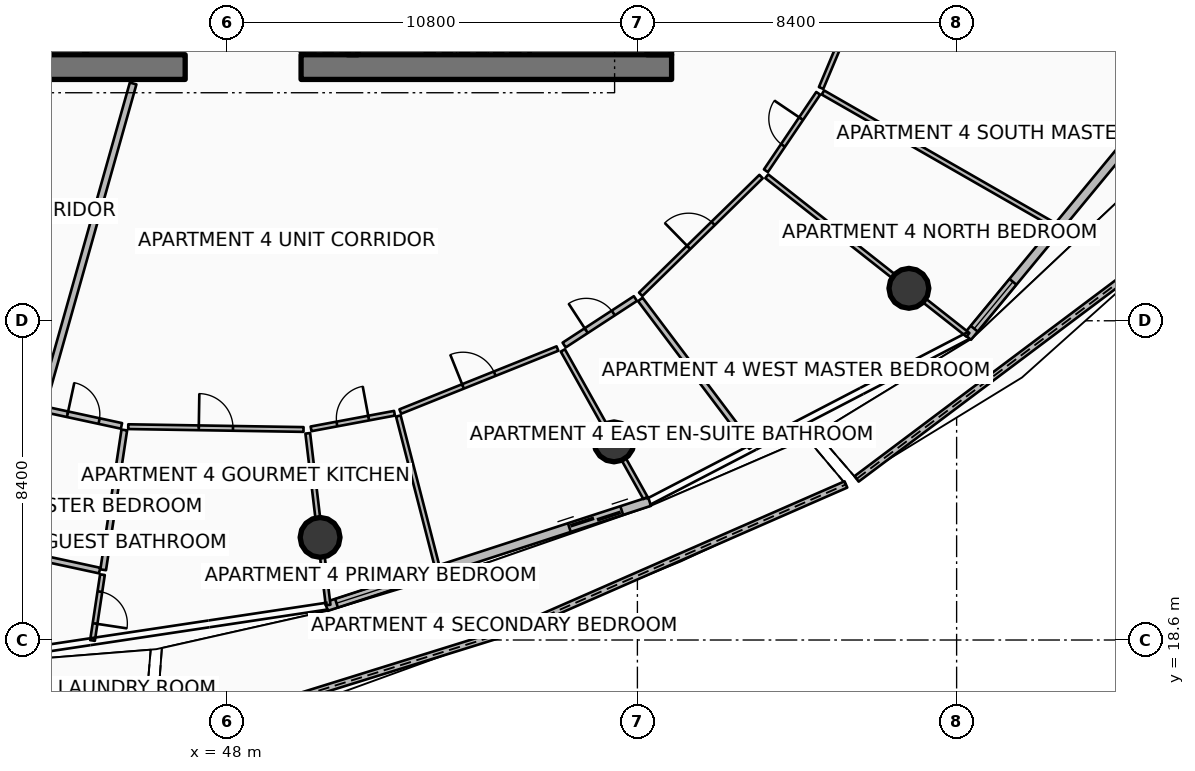
"""IFC4 building model, lengths in metres.
Left out: names, types, materials, properties, quantities, classifications, styles, units other than length and angle.
Written with IfcOpenShell. Run it as: python <this file> out.ifc"""

import sys

from ifc_helpers import new_model, si_unit, direction, frame, frame_2d, origin, origin_2d, place, context, subcontext, project, spatial, polyline, rectangle, circle, outline, extrude, element, fill, save


model = new_model("IFC4")
c1 = context("Model", 3, precision=1e-05, world=origin(), true_north=direction((0.0, 1.0)))
c2 = subcontext(c1, "Body", "Model", "MODEL_VIEW")
j1 = project(units=[si_unit("LENGTHUNIT", "METRE"), si_unit("PLANEANGLEUNIT", "RADIAN")], contexts=[c1])
p1 = place(None, origin())
s1 = spatial("IfcSite", under=j1, at=p1, CompositionType="ELEMENT")
p2 = place(p1, origin())
s2 = spatial("IfcBuilding", under=s1, at=p2, CompositionType="ELEMENT")
p3 = place(p2, frame((0.0, 0.0, 176.55)))
s3 = spatial("IfcBuildingStorey", under=s2, at=p3, CompositionType="ELEMENT", Elevation=176.55)
for number, where, z_axis, x_axis in (
    (1, (37.15, 33.675, 0.0), (0.0, 0.0, 1.0), (1.0, 0.0, 0.0)),
    (2, (49.95, 33.675, 0.0), (0.0, 0.0, 1.0), (1.0, 0.0, 0.0)),
):
    element("IfcWall", number, at=place(p3, frame(where, z_axis=z_axis, x_axis=x_axis)), inside=s3, PredefinedType="SHEAR", context=c2, shape_type="SweptSolid", body=[
        extrude(rectangle(XDim=9.75, YDim=0.65, at=frame_2d((4.875, 0.0))), origin(), (0.0, 0.0, 1.0), 3.75),
    ])
p4 = place(p3, frame((59.375, 34.0, 0.0), z_axis=(0.0, 0.0, 1.0), x_axis=(0.0, 1.0, 0.0)))
e3 = element("IfcWall", 3, at=p4, inside=s3, PredefinedType="SHEAR", context=c2, shape_type="SweptSolid", body=[
    extrude(rectangle(XDim=16.0, YDim=0.65, at=frame_2d((8.0, 0.0))), origin(), (0.0, 0.0, 1.0), 3.75),
])
p5 = place(p3, frame((51.31, 34.0, 0.0), z_axis=(0.0, 0.0, 1.0), x_axis=(0.0, 1.0, 0.0)))
e4 = element("IfcWall", 4, at=p5, inside=s3, PredefinedType="SHEAR", context=c2, shape_type="SweptSolid", body=[
    extrude(rectangle(XDim=3.5, YDim=0.28, at=frame_2d((1.75, 0.0))), origin(), (0.0, 0.0, 1.0), 3.75),
])
for number, where, z_axis, x_axis in (
    (5, (50.45, 21.3, 0.0), (0.0, 0.0, 1.0), (1.0, 0.0, 0.0)),
    (6, (58.185, 23.814, 0.0), (0.0, 0.0, 1.0), (1.0, 0.0, 0.0)),
    (7, (65.944, 27.854, 0.0), (0.0, 0.0, 1.0), (1.0, 0.0, 0.0)),
):
    element("IfcColumn", number, at=place(p3, frame(where, z_axis=z_axis, x_axis=x_axis)), inside=s3, PredefinedType="COLUMN", context=c2, shape_type="SweptSolid", body=[
        extrude(circle(Radius=0.525, at=origin_2d()), origin(), (0.0, 0.0, 1.0), 3.5),
    ])
p6 = place(p3, frame((46.108, 15.929, 0.0), z_axis=(0.0, 0.0, 1.0), x_axis=(0.954909554677, 0.296896854793, 0.0)))
e8 = element("IfcWall", 8, at=p6, inside=s3, PredefinedType="PARAPET", context=c2, shape_type="SweptSolid", body=[
    extrude(outline(polyline([(0.0, 0.0), (9.736, 0.0), (9.736, 1.348), (4.868, 1.562), (0.0, 1.747), (0.0, 0.0)])), frame((0.0, 0.09, 0.0), z_axis=(0.0, -1.0, 0.0), x_axis=(1.0, 0.0, 0.0)), (0.0, 0.0, 1.0), 0.18),
])
p7 = place(p3, frame((55.63, 18.903, 0.0), z_axis=(0.0, 0.0, 1.0), x_axis=(0.916057097562, 0.401047869968, 0.0)))
e9 = element("IfcWall", 9, at=p7, inside=s3, PredefinedType="PARAPET", context=c2, shape_type="SweptSolid", body=[
    extrude(outline(polyline([(0.0, 0.0), (9.45, 0.0), (9.45, 1.12), (4.725, 1.182), (0.0, 1.348), (0.0, 0.0)])), frame((0.0, 0.09, 0.0), z_axis=(0.0, -1.0, 0.0), x_axis=(1.0, 0.0, 0.0)), (0.0, 0.0, 1.0), 0.18),
])
p8 = place(p3, frame((64.568, 22.84, 0.0), z_axis=(0.0, 0.0, 1.0), x_axis=(0.799768695593, 0.600308282093, 0.0)))
e10 = element("IfcWall", 10, at=p8, inside=s3, PredefinedType="PARAPET", context=c2, shape_type="SweptSolid", body=[
    extrude(outline(polyline([(0.0, 0.0), (10.515, 0.0), (10.515, 1.348), (5.258, 1.182), (0.0, 1.12), (0.0, 0.0)])), frame((0.0, 0.09, 0.0), z_axis=(0.0, -1.0, 0.0), x_axis=(1.0, 0.0, 0.0)), (0.0, 0.0, 1.0), 0.18),
])
p9 = place(p3, frame((50.616, 19.481, 0.0), z_axis=(0.0, 0.0, 1.0), x_axis=(0.951058543936, 0.309010753869, 0.0)))
e11 = element("IfcWall", 11, at=p9, inside=s3, PredefinedType="SOLIDWALL", context=c2, shape_type="SweptSolid", body=[
    extrude(rectangle(XDim=8.942, YDim=0.24, at=frame_2d((4.471, 0.0))), origin(), (0.0, 0.0, 1.0), 2.45),
])
p10 = place(p9, frame((6.722, 0.0, 0.0)))
e12 = element("IfcOpeningElement", 12, at=p10, cuts=e11, PredefinedType="OPENING", context=c2, shape_type="SweptSolid", body=[
    extrude(rectangle(XDim=1.45, YDim=2.15, at=frame_2d((0.725, 1.075))), frame((0.0, 0.13, 0.0), z_axis=(0.0, -1.0, 0.0), x_axis=(1.0, 0.0, 0.0)), (0.0, 0.0, 1.0), 0.26),
])
p11 = place(p9, frame((0.28, 0.0, 0.65)))
e13 = element("IfcOpeningElement", 13, at=p11, cuts=e11, PredefinedType="OPENING", context=c2, shape_type="SweptSolid", body=[
    extrude(rectangle(XDim=1.6, YDim=1.5, at=frame_2d((0.8, 0.75))), frame((0.0, 0.13, 0.0), z_axis=(0.0, -1.0, 0.0), x_axis=(1.0, 0.0, 0.0)), (0.0, 0.0, 1.0), 0.26),
])
p12 = place(p3, frame((67.485, 26.576, 0.0), z_axis=(0.0, 0.0, 1.0), x_axis=(0.636759394418, 0.771062561418, 0.0)))
e14 = element("IfcWall", 14, at=p12, inside=s3, PredefinedType="SOLIDWALL", context=c2, shape_type="SweptSolid", body=[
    extrude(rectangle(XDim=10.494, YDim=0.24, at=frame_2d((5.247, 0.0))), origin(), (0.0, 0.0, 1.0), 2.45),
])
p13 = place(p12, frame((8.274, 0.0, 0.0)))
e15 = element("IfcOpeningElement", 15, at=p13, cuts=e14, PredefinedType="OPENING", context=c2, shape_type="SweptSolid", body=[
    extrude(rectangle(XDim=1.45, YDim=2.15, at=frame_2d((0.725, 1.075))), frame((0.0, 0.13, 0.0), z_axis=(0.0, -1.0, 0.0), x_axis=(1.0, 0.0, 0.0)), (0.0, 0.0, 1.0), 0.26),
])
p14 = place(p12, frame((0.28, 0.0, 0.65)))
e16 = element("IfcOpeningElement", 16, at=p14, cuts=e14, PredefinedType="OPENING", context=c2, shape_type="SweptSolid", body=[
    extrude(rectangle(XDim=1.6, YDim=1.5, at=frame_2d((0.8, 0.75))), frame((0.0, 0.13, 0.0), z_axis=(0.0, -1.0, 0.0), x_axis=(1.0, 0.0, 0.0)), (0.0, 0.0, 1.0), 0.26),
])
p15 = place(p3, frame((44.28, 34.05, 0.0), z_axis=(0.0, 0.0, 1.0), x_axis=(0.0, 1.0, 0.0)))
e17 = element("IfcWall", 17, at=p15, inside=s3, PredefinedType="PARTITIONING", context=c2, shape_type="SweptSolid", body=[
    extrude(rectangle(XDim=2.03, YDim=0.125, at=frame_2d((1.015, 0.0))), origin(), (0.0, 0.0, 1.0), 2.94),
])
p16 = place(p3, frame((45.531, 33.244, 0.0), z_axis=(0.0, 0.0, 1.0), x_axis=(-0.271437162306, -0.962456163635, 0.0)))
e18 = element("IfcWall", 18, at=p16, inside=s3, PredefinedType="PARTITIONING", context=c2, shape_type="SweptSolid", body=[
    extrude(rectangle(XDim=15.63, YDim=0.18, at=frame_2d((7.815, 0.0))), origin(), (0.0, 0.0, 1.0), 2.94),
])
p17 = place(p3, frame((43.215, 24.667, 0.0), z_axis=(0.0, 0.0, 1.0), x_axis=(0.977507597701, -0.210900204925, 0.0)))
e19 = element("IfcWall", 19, at=p17, inside=s3, PredefinedType="PARTITIONING", context=c2, shape_type="SweptSolid", body=[
    extrude(rectangle(XDim=2.055, YDim=0.15, at=frame_2d((1.027, 0.0))), origin(), (0.0, 0.0, 1.0), 2.94),
])
p18 = place(p17, frame((0.602, 0.0, 0.0)))
e20 = element("IfcOpeningElement", 20, at=p18, cuts=e19, PredefinedType="OPENING", context=c2, shape_type="SweptSolid", body=[
    extrude(rectangle(XDim=0.85, YDim=2.06, at=frame_2d((0.425, 1.03))), frame((0.0, 0.085, 0.0), z_axis=(0.0, -1.0, 0.0), x_axis=(1.0, 0.0, 0.0)), (0.0, 0.0, 1.0), 0.17),
])
p19 = place(p3, frame((42.17, 20.962, 0.0), z_axis=(0.0, 0.0, 1.0), x_axis=(0.977505473959, -0.210910048076, 0.0)))
e21 = element("IfcWall", 21, at=p19, inside=s3, PredefinedType="PARTITIONING", context=c2, shape_type="SweptSolid", body=[
    extrude(rectangle(XDim=2.535, YDim=0.15, at=frame_2d((1.268, 0.0))), origin(), (0.0, 0.0, 1.0), 2.94),
])
p20 = place(p3, frame((45.298, 24.126, 0.0), z_axis=(0.0, 0.0, 1.0), x_axis=(-0.149437927454, -0.988771108922, 0.0)))
e22 = element("IfcWall", 22, at=p20, inside=s3, PredefinedType="PARTITIONING", context=c2, shape_type="SweptSolid", body=[
    extrude(rectangle(XDim=3.72, YDim=0.15, at=frame_2d((1.86, 0.0))), origin(), (0.0, 0.0, 1.0), 2.94),
])
p21 = place(p3, frame((44.723, 20.319, 0.0), z_axis=(0.0, 0.0, 1.0), x_axis=(-0.14945844671, -0.988768007526, 0.0)))
e23 = element("IfcWall", 23, at=p21, inside=s3, PredefinedType="PARTITIONING", context=c2, shape_type="SweptSolid", body=[
    extrude(rectangle(XDim=1.751, YDim=0.125, at=frame_2d((0.875, 0.0))), origin(), (0.0, 0.0, 1.0), 2.94),
])
p22 = place(p21, frame((0.451, 0.0, 0.0)))
e24 = element("IfcOpeningElement", 24, at=p22, cuts=e23, PredefinedType="OPENING", context=c2, shape_type="SweptSolid", body=[
    extrude(rectangle(XDim=0.85, YDim=2.06, at=frame_2d((0.425, 1.03))), frame((0.0, 0.073, 0.0), z_axis=(0.0, -1.0, 0.0), x_axis=(1.0, 0.0, 0.0)), (0.0, 0.0, 1.0), 0.145),
])
p23 = place(p3, frame((45.402, 24.214, 0.0), z_axis=(0.0, 0.0, 1.0), x_axis=(0.999870557478, -0.016089384368, 0.0)))
e25 = element("IfcWall", 25, at=p23, inside=s3, PredefinedType="PARTITIONING", context=c2, shape_type="SweptSolid", body=[
    extrude(rectangle(XDim=4.613, YDim=0.125, at=frame_2d((2.306, 0.0))), origin(), (0.0, 0.0, 1.0), 2.94),
])
p24 = place(p23, frame((1.856, 0.0, 0.0)))
e26 = element("IfcOpeningElement", 26, at=p24, cuts=e25, PredefinedType="OPENING", context=c2, shape_type="SweptSolid", body=[
    extrude(rectangle(XDim=0.9, YDim=2.08, at=frame_2d((0.45, 1.04))), frame((0.0, 0.073, 0.0), z_axis=(0.0, -1.0, 0.0), x_axis=(1.0, 0.0, 0.0)), (0.0, 0.0, 1.0), 0.145),
])
p25 = place(p3, frame((50.126, 24.038, 0.0), z_axis=(0.0, 0.0, 1.0), x_axis=(0.117498349672, -0.993073077787, 0.0)))
e27 = element("IfcWall", 27, at=p25, inside=s3, PredefinedType="PARTITIONING", context=c2, shape_type="SweptSolid", body=[
    extrude(rectangle(XDim=4.548, YDim=0.125, at=frame_2d((2.274, 0.0))), origin(), (0.0, 0.0, 1.0), 2.94),
])
p26 = place(p3, frame((52.51, 24.494, 0.0), z_axis=(0.0, 0.0, 1.0), x_axis=(0.249438502074, -0.968390641055, 0.0)))
e28 = element("IfcWall", 28, at=p26, inside=s3, PredefinedType="PARTITIONING", context=c2, shape_type="SweptSolid", body=[
    extrude(rectangle(XDim=4.066, YDim=0.125, at=frame_2d((2.033, 0.0))), origin(), (0.0, 0.0, 1.0), 2.94),
])
p27 = place(p3, frame((50.212, 24.156, 0.0), z_axis=(0.0, 0.0, 1.0), x_axis=(0.982938932549, 0.183932201855, 0.0)))
e29 = element("IfcWall", 29, at=p27, inside=s3, PredefinedType="PARTITIONING", context=c2, shape_type="SweptSolid", body=[
    extrude(rectangle(XDim=2.234, YDim=0.125, at=frame_2d((1.117, 0.0))), origin(), (0.0, 0.0, 1.0), 2.94),
])
p28 = place(p27, frame((0.692, 0.0, 0.0)))
e30 = element("IfcOpeningElement", 30, at=p28, cuts=e29, PredefinedType="OPENING", context=c2, shape_type="SweptSolid", body=[
    extrude(rectangle(XDim=0.85, YDim=2.06, at=frame_2d((0.425, 1.03))), frame((0.0, 0.073, 0.0), z_axis=(0.0, -1.0, 0.0), x_axis=(1.0, 0.0, 0.0)), (0.0, 0.0, 1.0), 0.145),
])
p29 = place(p3, frame((52.561, 24.611, 0.0), z_axis=(0.0, 0.0, 1.0), x_axis=(0.92816265329, 0.372174809784, 0.0)))
e31 = element("IfcWall", 31, at=p29, inside=s3, PredefinedType="PARTITIONING", context=c2, shape_type="SweptSolid", body=[
    extrude(rectangle(XDim=4.455, YDim=0.125, at=frame_2d((2.228, 0.0))), origin(), (0.0, 0.0, 1.0), 2.94),
])
p30 = place(p29, frame((1.777, 0.0, 0.0)))
e32 = element("IfcOpeningElement", 32, at=p30, cuts=e31, PredefinedType="OPENING", context=c2, shape_type="SweptSolid", body=[
    extrude(rectangle(XDim=0.9, YDim=2.08, at=frame_2d((0.45, 1.04))), frame((0.0, 0.073, 0.0), z_axis=(0.0, -1.0, 0.0), x_axis=(1.0, 0.0, 0.0)), (0.0, 0.0, 1.0), 0.145),
])
p31 = place(p3, frame((56.838, 26.219, 0.0), z_axis=(0.0, 0.0, 1.0), x_axis=(0.488608382443, -0.872503208365, 0.0)))
e33 = element("IfcWall", 33, at=p31, inside=s3, PredefinedType="PARTITIONING", context=c2, shape_type="SweptSolid", body=[
    extrude(rectangle(XDim=4.448, YDim=0.125, at=frame_2d((2.224, 0.0))), origin(), (0.0, 0.0, 1.0), 2.94),
])
p32 = place(p3, frame((56.873, 26.361, 0.0), z_axis=(0.0, 0.0, 1.0), x_axis=(0.837497725381, 0.54644081105, 0.0)))
e34 = element("IfcWall", 34, at=p32, inside=s3, PredefinedType="PARTITIONING", context=c2, shape_type="SweptSolid", body=[
    extrude(rectangle(XDim=2.238, YDim=0.15, at=frame_2d((1.119, 0.0))), origin(), (0.0, 0.0, 1.0), 2.94),
])
p33 = place(p32, frame((0.694, 0.0, 0.0)))
e35 = element("IfcOpeningElement", 35, at=p33, cuts=e34, PredefinedType="OPENING", context=c2, shape_type="SweptSolid", body=[
    extrude(rectangle(XDim=0.85, YDim=2.06, at=frame_2d((0.425, 1.03))), frame((0.0, 0.085, 0.0), z_axis=(0.0, -1.0, 0.0), x_axis=(1.0, 0.0, 0.0)), (0.0, 0.0, 1.0), 0.17),
])
p34 = place(p3, frame((58.876, 27.561, 0.0), z_axis=(0.0, 0.0, 1.0), x_axis=(0.601652635262, -0.798757852219, 0.0)))
e36 = element("IfcWall", 36, at=p34, inside=s3, PredefinedType="PARTITIONING", context=c2, shape_type="SweptSolid", body=[
    extrude(rectangle(XDim=4.865, YDim=0.15, at=frame_2d((2.433, 0.0))), origin(), (0.0, 0.0, 1.0), 2.94),
])
p35 = place(p3, frame((58.887, 27.696, 0.0), z_axis=(0.0, 0.0, 1.0), x_axis=(0.714833426799, 0.699294767556, 0.0)))
e37 = element("IfcWall", 37, at=p35, inside=s3, PredefinedType="PARTITIONING", context=c2, shape_type="SweptSolid", body=[
    extrude(rectangle(XDim=4.431, YDim=0.125, at=frame_2d((2.215, 0.0))), origin(), (0.0, 0.0, 1.0), 2.94),
])
p36 = place(p35, frame((1.765, 0.0, 0.0)))
e38 = element("IfcOpeningElement", 38, at=p36, cuts=e37, PredefinedType="OPENING", context=c2, shape_type="SweptSolid", body=[
    extrude(rectangle(XDim=0.9, YDim=2.08, at=frame_2d((0.45, 1.04))), frame((0.0, 0.073, 0.0), z_axis=(0.0, -1.0, 0.0), x_axis=(1.0, 0.0, 0.0)), (0.0, 0.0, 1.0), 0.145),
])
p37 = place(p3, frame((62.204, 30.802, 0.0), z_axis=(0.0, 0.0, 1.0), x_axis=(0.785315561472, -0.619095686393, 0.0)))
e39 = element("IfcWall", 39, at=p37, inside=s3, PredefinedType="PARTITIONING", context=c2, shape_type="SweptSolid", body=[
    extrude(rectangle(XDim=6.74, YDim=0.125, at=frame_2d((3.37, 0.0))), origin(), (0.0, 0.0, 1.0), 2.94),
])
p38 = place(p3, frame((63.681, 33.007, 0.0), z_axis=(0.0, 0.0, 1.0), x_axis=(0.867459238173, -0.497508261347, 0.0)))
e40 = element("IfcWall", 40, at=p38, inside=s3, PredefinedType="PARTITIONING", context=c2, shape_type="SweptSolid", body=[
    extrude(rectangle(XDim=7.005, YDim=0.125, at=frame_2d((3.502, 0.0))), origin(), (0.0, 0.0, 1.0), 2.94),
])
p39 = place(p3, frame((62.181, 30.947, 0.0), z_axis=(0.0, 0.0, 1.0), x_axis=(0.559798463615, 0.82862879514, 0.0)))
e41 = element("IfcWall", 41, at=p39, inside=s3, PredefinedType="PARTITIONING", context=c2, shape_type="SweptSolid", body=[
    extrude(rectangle(XDim=2.459, YDim=0.125, at=frame_2d((1.229, 0.0))), origin(), (0.0, 0.0, 1.0), 2.94),
])
p40 = place(p39, frame((0.805, 0.0, 0.0)))
e42 = element("IfcOpeningElement", 42, at=p40, cuts=e41, PredefinedType="OPENING", context=c2, shape_type="SweptSolid", body=[
    extrude(rectangle(XDim=0.85, YDim=2.06, at=frame_2d((0.425, 1.03))), frame((0.0, 0.073, 0.0), z_axis=(0.0, -1.0, 0.0), x_axis=(1.0, 0.0, 0.0)), (0.0, 0.0, 1.0), 0.145),
])
p41 = place(p3, frame((63.634, 33.125, 0.0), z_axis=(0.0, 0.0, 1.0), x_axis=(0.387404173838, 0.921909977217, 0.0)))
e43 = element("IfcWall", 43, at=p41, inside=s3, PredefinedType="PARTITIONING", context=c2, shape_type="SweptSolid", body=[
    extrude(rectangle(XDim=4.23, YDim=0.125, at=frame_2d((2.115, 0.0))), origin(), (0.0, 0.0, 1.0), 2.94),
])
p42 = place(p41, frame((1.665, 0.0, 0.0)))
e44 = element("IfcOpeningElement", 44, at=p42, cuts=e43, PredefinedType="OPENING", context=c2, shape_type="SweptSolid", body=[
    extrude(rectangle(XDim=0.9, YDim=2.08, at=frame_2d((0.45, 1.04))), frame((0.0, 0.073, 0.0), z_axis=(0.0, -1.0, 0.0), x_axis=(1.0, 0.0, 0.0)), (0.0, 0.0, 1.0), 0.145),
])
p43 = place(p10, origin())
e45 = element("IfcDoor", 45, at=p43, inside=s3, OperationType="DOUBLE_DOOR_SLIDING", PredefinedType="DOOR", context=c2, shape_type="SweptSolid", body=[
    extrude(rectangle(XDim=1.45, YDim=2.15, at=frame_2d((0.725, 1.075))), frame((0.0, 0.025, 0.0), z_axis=(0.0, -1.0, 0.0), x_axis=(1.0, 0.0, 0.0)), (0.0, 0.0, 1.0), 0.05),
])
fill(e12, e45)
p44 = place(p11, origin())
e46 = element("IfcWindow", 46, at=p44, inside=s3, PartitioningType="SINGLE_PANEL", PredefinedType="WINDOW", context=c2, shape_type="SweptSolid", body=[
    extrude(rectangle(XDim=1.6, YDim=1.5, at=frame_2d((0.8, 0.75))), frame((0.0, 0.03, 0.0), z_axis=(0.0, -1.0, 0.0), x_axis=(1.0, 0.0, 0.0)), (0.0, 0.0, 1.0), 0.06),
])
fill(e13, e46)
p45 = place(p14, origin())
e47 = element("IfcWindow", 47, at=p45, inside=s3, PartitioningType="SINGLE_PANEL", PredefinedType="WINDOW", context=c2, shape_type="SweptSolid", body=[
    extrude(rectangle(XDim=1.6, YDim=1.5, at=frame_2d((0.8, 0.75))), frame((0.0, 0.03, 0.0), z_axis=(0.0, -1.0, 0.0), x_axis=(1.0, 0.0, 0.0)), (0.0, 0.0, 1.0), 0.06),
])
fill(e16, e47)
p46 = place(p18, origin())
e48 = element("IfcDoor", 48, at=p46, inside=s3, OperationType="SINGLE_SWING_LEFT", PredefinedType="DOOR", context=c2, shape_type="SweptSolid", body=[
    extrude(rectangle(XDim=0.85, YDim=2.06, at=frame_2d((0.425, 1.03))), frame((0.0, 0.025, 0.0), z_axis=(0.0, -1.0, 0.0), x_axis=(1.0, 0.0, 0.0)), (0.0, 0.0, 1.0), 0.05),
])
fill(e20, e48)
p47 = place(p22, origin())
e49 = element("IfcDoor", 49, at=p47, inside=s3, OperationType="SINGLE_SWING_RIGHT", PredefinedType="DOOR", context=c2, shape_type="SweptSolid", body=[
    extrude(rectangle(XDim=0.85, YDim=2.06, at=frame_2d((0.425, 1.03))), frame((0.0, 0.025, 0.0), z_axis=(0.0, -1.0, 0.0), x_axis=(1.0, 0.0, 0.0)), (0.0, 0.0, 1.0), 0.05),
])
fill(e24, e49)
p48 = place(p24, origin())
e50 = element("IfcDoor", 50, at=p48, inside=s3, OperationType="SINGLE_SWING_LEFT", PredefinedType="DOOR", context=c2, shape_type="SweptSolid", body=[
    extrude(rectangle(XDim=0.9, YDim=2.08, at=frame_2d((0.45, 1.04))), frame((0.0, 0.025, 0.0), z_axis=(0.0, -1.0, 0.0), x_axis=(1.0, 0.0, 0.0)), (0.0, 0.0, 1.0), 0.05),
])
fill(e26, e50)
p49 = place(p28, origin())
e51 = element("IfcDoor", 51, at=p49, inside=s3, OperationType="SINGLE_SWING_RIGHT", PredefinedType="DOOR", context=c2, shape_type="SweptSolid", body=[
    extrude(rectangle(XDim=0.85, YDim=2.06, at=frame_2d((0.425, 1.03))), frame((0.0, 0.025, 0.0), z_axis=(0.0, -1.0, 0.0), x_axis=(1.0, 0.0, 0.0)), (0.0, 0.0, 1.0), 0.05),
])
fill(e30, e51)
p50 = place(p30, origin())
e52 = element("IfcDoor", 52, at=p50, inside=s3, OperationType="SINGLE_SWING_LEFT", PredefinedType="DOOR", context=c2, shape_type="SweptSolid", body=[
    extrude(rectangle(XDim=0.9, YDim=2.08, at=frame_2d((0.45, 1.04))), frame((0.0, 0.025, 0.0), z_axis=(0.0, -1.0, 0.0), x_axis=(1.0, 0.0, 0.0)), (0.0, 0.0, 1.0), 0.05),
])
fill(e32, e52)
p51 = place(p33, origin())
e53 = element("IfcDoor", 53, at=p51, inside=s3, OperationType="SINGLE_SWING_LEFT", PredefinedType="DOOR", context=c2, shape_type="SweptSolid", body=[
    extrude(rectangle(XDim=0.85, YDim=2.06, at=frame_2d((0.425, 1.03))), frame((0.0, 0.025, 0.0), z_axis=(0.0, -1.0, 0.0), x_axis=(1.0, 0.0, 0.0)), (0.0, 0.0, 1.0), 0.05),
])
fill(e35, e53)
p52 = place(p36, origin())
e54 = element("IfcDoor", 54, at=p52, inside=s3, OperationType="SINGLE_SWING_LEFT", PredefinedType="DOOR", context=c2, shape_type="SweptSolid", body=[
    extrude(rectangle(XDim=0.9, YDim=2.08, at=frame_2d((0.45, 1.04))), frame((0.0, 0.025, 0.0), z_axis=(0.0, -1.0, 0.0), x_axis=(1.0, 0.0, 0.0)), (0.0, 0.0, 1.0), 0.05),
])
fill(e38, e54)
p53 = place(p40, origin())
e55 = element("IfcDoor", 55, at=p53, inside=s3, OperationType="SINGLE_SWING_RIGHT", PredefinedType="DOOR", context=c2, shape_type="SweptSolid", body=[
    extrude(rectangle(XDim=0.85, YDim=2.06, at=frame_2d((0.425, 1.03))), frame((0.0, 0.025, 0.0), z_axis=(0.0, -1.0, 0.0), x_axis=(1.0, 0.0, 0.0)), (0.0, 0.0, 1.0), 0.05),
])
fill(e42, e55)
save(model, sys.argv[1])
